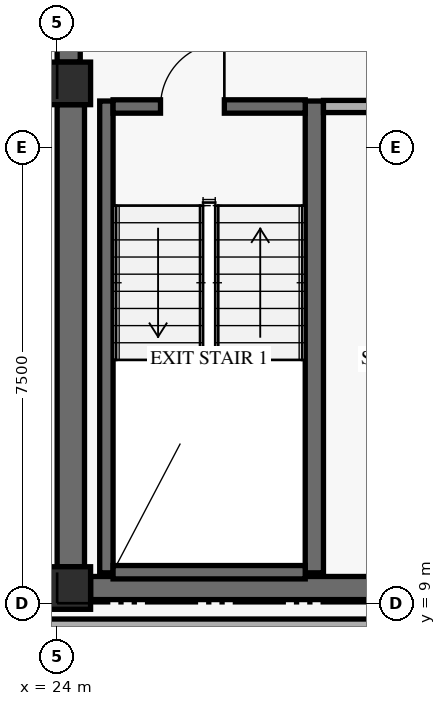
"""IFC4 building model, lengths in metres.
Left out: names, types, materials, properties, quantities, classifications, styles, units other than length and angle.
Written with IfcOpenShell. Run it as: python <this file> out.ifc"""

import sys

from ifc_helpers import new_model, si_unit, direction, frame, frame_2d, origin, origin_2d, place, context, subcontext, project, spatial, rectangle, extrude, element, fill, save


model = new_model("IFC4")
c1 = context("Model", 3, precision=1e-05, world=origin(), true_north=direction((0.0, 1.0)))
c2 = subcontext(c1, "Body", "Model", "MODEL_VIEW")
j1 = project(units=[si_unit("LENGTHUNIT", "METRE"), si_unit("PLANEANGLEUNIT", "RADIAN")], contexts=[c1])
p1 = place(None, origin())
s1 = spatial("IfcSite", under=j1, at=p1, CompositionType="ELEMENT")
p2 = place(p1, origin())
s2 = spatial("IfcBuilding", under=s1, at=p2, CompositionType="ELEMENT")
p3 = place(p2, frame((0.0, 0.0, 159.0)))
s3 = spatial("IfcBuildingStorey", under=s2, at=p3, CompositionType="ELEMENT", Elevation=159.0)
p4 = place(p3, frame((24.225, 9.6, 0.0), z_axis=(0.0, 0.0, 1.0), x_axis=(0.0, 1.0, 0.0)))
e1 = element("IfcWall", 1, at=p4, inside=s3, PredefinedType="SHEAR", context=c2, shape_type="SweptSolid", body=[
    extrude(rectangle(XDim=7.6, YDim=0.45, at=frame_2d((3.8, 0.0))), origin(), (0.0, 0.0, 1.0), 2.748),
])
p5 = place(p3, frame((24.19, 17.9, 0.0), z_axis=(0.0, 0.0, 1.0), x_axis=(0.0, 1.0, 0.0)))
e2 = element("IfcWall", 2, at=p5, inside=s3, PredefinedType="SHEAR", context=c2, shape_type="SweptSolid", body=[
    extrude(rectangle(XDim=11.95, YDim=0.38, at=frame_2d((5.975, 0.0))), origin(), (0.0, 0.0, 1.0), 2.748),
])
p6 = place(p3, frame((24.55, 9.25, 0.0), z_axis=(0.0, 0.0, 1.0), x_axis=(1.0, 0.0, 0.0)))
e3 = element("IfcWall", 3, at=p6, inside=s3, PredefinedType="SHEAR", context=c2, shape_type="SweptSolid", body=[
    extrude(rectangle(XDim=10.3, YDim=0.38, at=frame_2d((5.15, 0.0))), origin(), (0.0, 0.0, 1.0), 3.36),
])
p7 = place(p6, frame((5.2, 0.0, 0.0)))
e4 = element("IfcOpeningElement", 4, at=p7, cuts=e3, PredefinedType="OPENING", context=c2, shape_type="SweptSolid", body=[
    extrude(rectangle(XDim=1.05, YDim=2.15, at=frame_2d((0.525, 1.075))), frame((0.0, 0.2, 0.0), z_axis=(0.0, -1.0, 0.0), x_axis=(1.0, 0.0, 0.0)), (0.0, 0.0, 1.0), 0.4),
])
p8 = place(p3, frame((24.81, 9.5, 0.0), z_axis=(0.0, 0.0, 1.0), x_axis=(0.0, 1.0, 0.0)))
e5 = element("IfcWall", 5, at=p8, inside=s3, PredefinedType="SHEAR", context=c2, shape_type="SweptSolid", body=[
    extrude(rectangle(XDim=7.76, YDim=0.22, at=frame_2d((3.88, 0.0))), origin(), (0.0, 0.0, 1.0), 3.36),
])
p9 = place(p3, frame((28.23, 9.5, 0.0), z_axis=(0.0, 0.0, 1.0), x_axis=(0.0, 1.0, 0.0)))
e6 = element("IfcWall", 6, at=p9, inside=s3, PredefinedType="SHEAR", context=c2, shape_type="SweptSolid", body=[
    extrude(rectangle(XDim=7.76, YDim=0.3, at=frame_2d((3.88, 0.0))), origin(), (0.0, 0.0, 1.0), 3.36),
])
p10 = place(p3, frame((24.92, 9.51, 0.0), z_axis=(0.0, 0.0, 1.0), x_axis=(1.0, 0.0, 0.0)))
e7 = element("IfcWall", 7, at=p10, inside=s3, PredefinedType="SHEAR", context=c2, shape_type="SweptSolid", body=[
    extrude(rectangle(XDim=3.16, YDim=0.22, at=frame_2d((1.58, 0.0))), origin(), (0.0, 0.0, 1.0), 3.36),
])
p11 = place(p3, frame((24.92, 17.17, 0.0), z_axis=(0.0, 0.0, 1.0), x_axis=(1.0, 0.0, 0.0)))
e8 = element("IfcWall", 8, at=p11, inside=s3, PredefinedType="SHEAR", context=c2, shape_type="SweptSolid", body=[
    extrude(rectangle(XDim=3.16, YDim=0.22, at=frame_2d((1.58, 0.0))), origin(), (0.0, 0.0, 1.0), 3.36),
])
p12 = place(p11, frame((0.78, 0.0, 0.0)))
e9 = element("IfcOpeningElement", 9, at=p12, cuts=e8, PredefinedType="OPENING", context=c2, shape_type="SweptSolid", body=[
    extrude(rectangle(XDim=1.05, YDim=2.15, at=frame_2d((0.525, 1.075))), frame((0.0, 0.12, 0.0), z_axis=(0.0, -1.0, 0.0), x_axis=(1.0, 0.0, 0.0)), (0.0, 0.0, 1.0), 0.24),
])
for number, where, z_axis, x_axis in (
    (10, (24.2, 9.25, 0.0), (0.0, 0.0, 1.0), (1.0, 0.0, 0.0)),
    (11, (24.2, 17.55, 0.0), (0.0, 0.0, 1.0), (1.0, 0.0, 0.0)),
):
    element("IfcColumn", number, at=place(p3, frame(where, z_axis=z_axis, x_axis=x_axis)), inside=s3, PredefinedType="COLUMN", context=c2, shape_type="SweptSolid", body=[
        extrude(rectangle(XDim=0.7, YDim=0.7, at=origin_2d()), origin(), (0.0, 0.0, 1.0), 3.6),
    ])
p13 = place(p3, frame((28.38, 17.17, 0.0), z_axis=(0.0, 0.0, 1.0), x_axis=(1.0, 0.0, 0.0)))
e12 = element("IfcWall", 12, at=p13, inside=s3, PredefinedType="STANDARD", context=c2, shape_type="SweptSolid", body=[
    extrude(rectangle(XDim=2.9, YDim=0.2, at=frame_2d((1.45, 0.0))), origin(), (0.0, 0.0, 1.0), 3.36),
])
p14 = place(p3, frame((23.85, 8.65, 0.0), z_axis=(0.0, 0.0, 1.0), x_axis=(1.0, 0.0, 0.0)))
e13 = element("IfcWall", 13, at=p14, inside=s3, PredefinedType="STANDARD", context=c2, shape_type="SweptSolid", body=[
    extrude(rectangle(XDim=11.57, YDim=0.18, at=frame_2d((5.785, 0.0))), origin(), (0.0, 0.0, 1.0), 2.73),
])
p15 = place(p12, frame((1.05, 0.0, 0.0), z_axis=(0.0, 0.0, 1.0), x_axis=(-1.0, 0.0, 0.0)))
e14 = element("IfcDoor", 14, at=p15, inside=s3, OperationType="SINGLE_SWING_LEFT", PredefinedType="DOOR", context=c2, shape_type="SweptSolid", body=[
    extrude(rectangle(XDim=1.05, YDim=2.15, at=frame_2d((0.525, 1.075))), frame((0.0, 0.025, 0.0), z_axis=(0.0, -1.0, 0.0), x_axis=(1.0, 0.0, 0.0)), (0.0, 0.0, 1.0), 0.05),
])
fill(e9, e14)
save(model, sys.argv[1])
